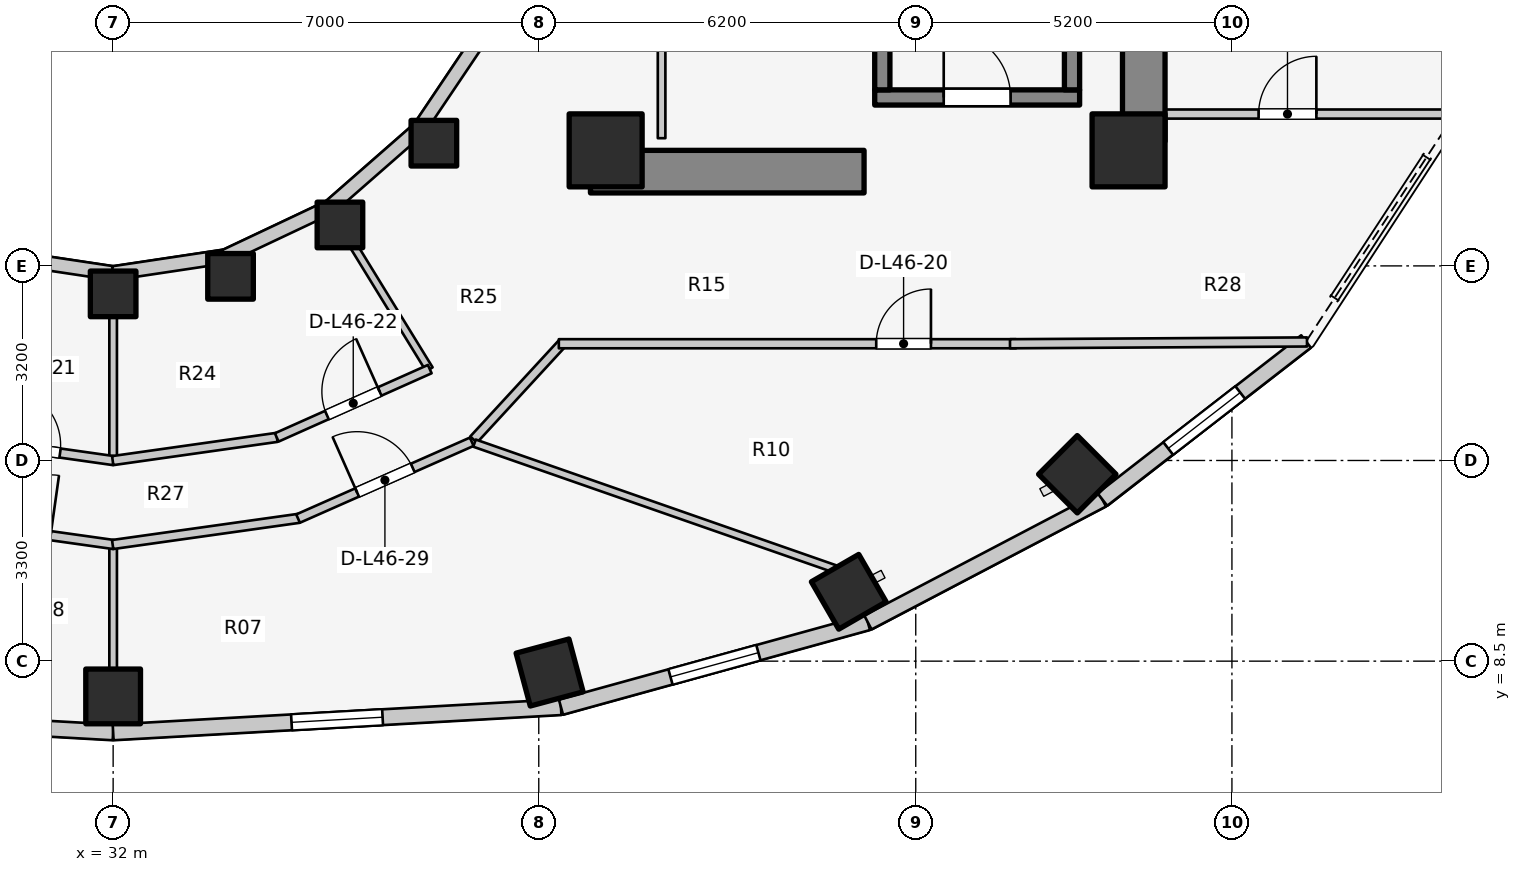
"""IFC4 building model, lengths in metres.
Left out: names, types, materials, properties, quantities, classifications, styles, units other than length and angle.
Written with IfcOpenShell. Run it as: python <this file> out.ifc"""

import sys

from ifc_helpers import new_model, si_unit, direction, frame, frame_2d, origin, origin_2d, place, context, subcontext, project, spatial, rectangle, extrude, element, fill, save


model = new_model("IFC4")
c1 = context("Model", 3, precision=1e-05, world=origin(), true_north=direction((0.0, 1.0)))
c2 = subcontext(c1, "Body", "Model", "MODEL_VIEW")
j1 = project(units=[si_unit("LENGTHUNIT", "METRE"), si_unit("PLANEANGLEUNIT", "RADIAN")], contexts=[c1])
p1 = place(None, origin())
s1 = spatial("IfcSite", under=j1, at=p1, CompositionType="ELEMENT")
p2 = place(p1, origin())
s2 = spatial("IfcBuilding", under=s1, at=p2, CompositionType="ELEMENT")
p3 = place(p2, frame((0.0, 0.0, 152.9)))
s3 = spatial("IfcBuildingStorey", under=s2, at=p3, CompositionType="ELEMENT", Elevation=152.9)
p4 = place(p3, frame((48.95, 17.05, 0.0), z_axis=(0.0, 0.0, 1.0), x_axis=(0.0, 1.0, 0.0)))
e1 = element("IfcWall", 1, at=p4, inside=s3, PredefinedType="SHEAR", context=c2, shape_type="SweptSolid", body=[
    extrude(rectangle(XDim=12.8, YDim=0.7, at=frame_2d((6.4, 0.0))), origin(), (0.0, 0.0, 1.0), 3.1),
])
p5 = place(p3, frame((39.85, 16.55, 0.0), z_axis=(0.0, 0.0, 1.0), x_axis=(1.0, 0.0, 0.0)))
e2 = element("IfcWall", 2, at=p5, inside=s3, PredefinedType="SHEAR", context=c2, shape_type="SweptSolid", body=[
    extrude(rectangle(XDim=4.5, YDim=0.7, at=frame_2d((2.25, 0.0))), origin(), (0.0, 0.0, 1.0), 3.1),
])
p6 = place(p3, frame((44.525, 17.77, 0.0), z_axis=(0.0, 0.0, 1.0), x_axis=(1.0, 0.0, 0.0)))
e3 = element("IfcWall", 3, at=p6, inside=s3, PredefinedType="SOLIDWALL", context=c2, shape_type="SweptSolid", body=[
    extrude(rectangle(XDim=3.37, YDim=0.25, at=frame_2d((1.685, 0.0))), origin(), (0.0, 0.0, 1.0), 3.1),
])
p7 = place(p6, frame((1.135, 0.0, 0.0)))
e4 = element("IfcOpeningElement", 4, at=p7, cuts=e3, PredefinedType="OPENING", context=c2, shape_type="SweptSolid", body=[
    extrude(rectangle(XDim=1.1, YDim=2.1, at=frame_2d((0.55, 1.05))), frame((0.0, 0.135, 0.0), z_axis=(0.0, -1.0, 0.0), x_axis=(1.0, 0.0, 0.0)), (0.0, 0.0, 1.0), 0.27),
])
for number, where, z_axis, x_axis in (
    (5, (44.65, 17.895, 0.0), (0.0, 0.0, 1.0), (0.0, 1.0, 0.0)),
    (6, (47.77, 17.895, 0.0), (0.0, 0.0, 1.0), (0.0, 1.0, 0.0)),
):
    element("IfcWall", number, at=place(p3, frame(where, z_axis=z_axis, x_axis=x_axis)), inside=s3, PredefinedType="SOLIDWALL", context=c2, shape_type="SweptSolid", body=[
        extrude(rectangle(XDim=7.81, YDim=0.25, at=frame_2d((3.905, 0.0))), origin(), (0.0, 0.0, 1.0), 3.1),
    ])
for number, where, z_axis, x_axis in (
    (7, (40.1, 16.9, 0.0), (0.0, 0.0, 1.0), (1.0, 0.0, 0.0)),
    (8, (48.7, 16.9, 0.0), (0.0, 0.0, 1.0), (1.0, 0.0, 0.0)),
):
    element("IfcColumn", number, at=place(p3, frame(where, z_axis=z_axis, x_axis=x_axis)), inside=s3, PredefinedType="COLUMN", context=c2, shape_type="SweptSolid", body=[
        extrude(rectangle(XDim=1.2, YDim=1.2, at=origin_2d()), origin(), (0.0, 0.0, 1.0), 3.1),
    ])
p8 = place(p3, frame((32.0, 14.54, 0.0), z_axis=(0.0, 0.0, 1.0), x_axis=(1.0, 0.0, 0.0)))
e9 = element("IfcColumn", 9, at=p8, inside=s3, PredefinedType="COLUMN", context=c2, shape_type="SweptSolid", body=[
    extrude(rectangle(XDim=0.75, YDim=0.75, at=origin_2d()), origin(), (0.0, 0.0, 1.0), 3.1),
])
p9 = place(p3, frame((32.0, 7.92, 0.0), z_axis=(0.0, 0.0, 1.0), x_axis=(0.0, -1.0, 0.0)))
e10 = element("IfcColumn", 10, at=p9, inside=s3, PredefinedType="COLUMN", context=c2, shape_type="SweptSolid", body=[
    extrude(rectangle(XDim=0.9, YDim=0.9, at=origin_2d()), origin(), (0.0, 0.0, 1.0), 3.1),
])
p10 = place(p3, frame((33.931, 14.828, 0.0), z_axis=(0.0, 0.0, 1.0), x_axis=(1.0, 0.0, 0.0)))
e11 = element("IfcColumn", 11, at=p10, inside=s3, PredefinedType="COLUMN", context=c2, shape_type="SweptSolid", body=[
    extrude(rectangle(XDim=0.75, YDim=0.75, at=origin_2d()), origin(), (0.0, 0.0, 1.0), 3.1),
])
p11 = place(p3, frame((39.178, 8.313, 0.0), z_axis=(0.0, 0.0, 1.0), x_axis=(0.258819045103, -0.965925826289, 0.0)))
e12 = element("IfcColumn", 12, at=p11, inside=s3, PredefinedType="COLUMN", context=c2, shape_type="SweptSolid", body=[
    extrude(rectangle(XDim=0.9, YDim=0.9, at=origin_2d()), origin(), (0.0, 0.0, 1.0), 3.1),
])
p12 = place(p3, frame((35.73, 15.673, 0.0), z_axis=(0.0, 0.0, 1.0), x_axis=(1.0, 0.0, 0.0)))
e13 = element("IfcColumn", 13, at=p12, inside=s3, PredefinedType="COLUMN", context=c2, shape_type="SweptSolid", body=[
    extrude(rectangle(XDim=0.75, YDim=0.75, at=origin_2d()), origin(), (0.0, 0.0, 1.0), 3.1),
])
p13 = place(p3, frame((44.098, 9.641, 0.0), z_axis=(0.0, 0.0, 1.0), x_axis=(0.5, -0.866025403784, 0.0)))
e14 = element("IfcColumn", 14, at=p13, inside=s3, PredefinedType="COLUMN", context=c2, shape_type="SweptSolid", body=[
    extrude(rectangle(XDim=0.9, YDim=0.9, at=origin_2d()), origin(), (0.0, 0.0, 1.0), 3.1),
])
p14 = place(p3, frame((37.275, 17.018, 0.0), z_axis=(0.0, 0.0, 1.0), x_axis=(1.0, 0.0, 0.0)))
e15 = element("IfcColumn", 15, at=p14, inside=s3, PredefinedType="COLUMN", context=c2, shape_type="SweptSolid", body=[
    extrude(rectangle(XDim=0.75, YDim=0.75, at=origin_2d()), origin(), (0.0, 0.0, 1.0), 3.1),
])
p15 = place(p3, frame((47.857, 11.573, 0.0), z_axis=(0.0, 0.0, 1.0), x_axis=(0.707106781187, -0.707106781187, 0.0)))
e16 = element("IfcColumn", 16, at=p15, inside=s3, PredefinedType="COLUMN", context=c2, shape_type="SweptSolid", body=[
    extrude(rectangle(XDim=0.9, YDim=0.9, at=origin_2d()), origin(), (0.0, 0.0, 1.0), 3.1),
])
for number, where, z_axis, x_axis in (
    (17, (30.157, 15.157, 0.0), (0.0, 0.0, 1.0), (0.989, -0.149, 0.0)),
    (18, (32.0, 14.88, 0.0), (0.0, 0.0, 1.0), (0.989, 0.149, 0.0)),
):
    element("IfcWall", number, at=place(p3, frame(where, z_axis=z_axis, x_axis=x_axis)), inside=s3, PredefinedType="STANDARD", context=c2, shape_type="SweptSolid", body=[
        extrude(rectangle(XDim=1.864, YDim=0.23, at=frame_2d((0.932, 0.0))), origin(), (0.0, 0.0, 1.0), 2.16),
    ])
p16 = place(p3, frame((33.843, 15.157, 0.0), z_axis=(0.0, 0.0, 1.0), x_axis=(0.904179699603, 0.427152280606, 0.0)))
e19 = element("IfcWall", 19, at=p16, inside=s3, PredefinedType="STANDARD", context=c2, shape_type="SweptSolid", body=[
    extrude(rectangle(XDim=1.899, YDim=0.23, at=frame_2d((0.95, 0.0))), origin(), (0.0, 0.0, 1.0), 2.16),
])
p17 = place(p3, frame((35.56, 15.968, 0.0), z_axis=(0.0, 0.0, 1.0), x_axis=(0.752576694707, 0.658504607869, 0.0)))
e20 = element("IfcWall", 20, at=p17, inside=s3, PredefinedType="STANDARD", context=c2, shape_type="SweptSolid", body=[
    extrude(rectangle(XDim=1.959, YDim=0.23, at=frame_2d((0.98, 0.0))), origin(), (0.0, 0.0, 1.0), 2.16),
])
p18 = place(p3, frame((37.035, 17.258, 0.0), z_axis=(0.0, 0.0, 1.0), x_axis=(0.558197800898, 0.829707909492, 0.0)))
e21 = element("IfcWall", 21, at=p18, inside=s3, PredefinedType="STANDARD", context=c2, shape_type="SweptSolid", body=[
    extrude(rectangle(XDim=2.027, YDim=0.23, at=frame_2d((1.013, 0.0))), origin(), (0.0, 0.0, 1.0), 2.16),
])
p19 = place(p3, frame((24.635, 7.743, 0.0), z_axis=(0.0, 0.0, 1.0), x_axis=(0.998417906562, -0.056228852534, 0.0)))
e22 = element("IfcWall", 22, at=p19, inside=s3, PredefinedType="STANDARD", context=c2, shape_type="SweptSolid", body=[
    extrude(rectangle(XDim=7.377, YDim=0.26, at=frame_2d((3.688, 0.0))), origin(), (0.0, 0.0, 1.0), 2.85),
])
p20 = place(p19, frame((2.488, 0.0, 0.75)))
e23 = element("IfcOpeningElement", 23, at=p20, cuts=e22, PredefinedType="OPENING", context=c2, shape_type="SweptSolid", body=[
    extrude(rectangle(XDim=2.4, YDim=1.7, at=frame_2d((1.2, 0.85))), frame((0.0, 0.14, 0.0), z_axis=(0.0, -1.0, 0.0), x_axis=(1.0, 0.0, 0.0)), (0.0, 0.0, 1.0), 0.28),
])
p21 = place(p3, frame((32.0, 7.329, 0.0), z_axis=(0.0, 0.0, 1.0), x_axis=(0.998417906562, 0.056228852534, 0.0)))
e24 = element("IfcWall", 24, at=p21, inside=s3, PredefinedType="STANDARD", context=c2, shape_type="SweptSolid", body=[
    extrude(rectangle(XDim=7.377, YDim=0.26, at=frame_2d((3.688, 0.0))), origin(), (0.0, 0.0, 1.0), 2.85),
])
p22 = place(p21, frame((2.938, 0.0, 0.75)))
e25 = element("IfcOpeningElement", 25, at=p22, cuts=e24, PredefinedType="OPENING", context=c2, shape_type="SweptSolid", body=[
    extrude(rectangle(XDim=1.5, YDim=1.6, at=frame_2d((0.75, 0.8))), frame((0.0, 0.14, 0.0), z_axis=(0.0, -1.0, 0.0), x_axis=(1.0, 0.0, 0.0)), (0.0, 0.0, 1.0), 0.28),
])
p23 = place(p3, frame((39.365, 7.743, 0.0), z_axis=(0.0, 0.0, 1.0), x_axis=(0.963953455704, 0.26607092144, 0.0)))
e26 = element("IfcWall", 26, at=p23, inside=s3, PredefinedType="STANDARD", context=c2, shape_type="SweptSolid", body=[
    extrude(rectangle(XDim=5.237, YDim=0.26, at=frame_2d((2.618, 0.0))), origin(), (0.0, 0.0, 1.0), 2.85),
])
p24 = place(p23, frame((1.868, 0.0, 0.75)))
e27 = element("IfcOpeningElement", 27, at=p24, cuts=e26, PredefinedType="OPENING", context=c2, shape_type="SweptSolid", body=[
    extrude(rectangle(XDim=1.5, YDim=1.6, at=frame_2d((0.75, 0.8))), frame((0.0, 0.14, 0.0), z_axis=(0.0, -1.0, 0.0), x_axis=(1.0, 0.0, 0.0)), (0.0, 0.0, 1.0), 0.28),
])
p25 = place(p3, frame((44.413, 9.137, 0.0), z_axis=(0.0, 0.0, 1.0), x_axis=(0.885660265226, 0.464333818065, 0.0)))
e28 = element("IfcWall", 28, at=p25, inside=s3, PredefinedType="STANDARD", context=c2, shape_type="SweptSolid", body=[
    extrude(rectangle(XDim=4.354, YDim=0.26, at=frame_2d((2.177, 0.0))), origin(), (0.0, 0.0, 1.0), 2.85),
])
p26 = place(p3, frame((48.269, 11.158, 0.0), z_axis=(0.0, 0.0, 1.0), x_axis=(0.790185650662, 0.612867552973, 0.0)))
e29 = element("IfcWall", 29, at=p26, inside=s3, PredefinedType="STANDARD", context=c2, shape_type="SweptSolid", body=[
    extrude(rectangle(XDim=4.239, YDim=0.26, at=frame_2d((2.12, 0.0))), origin(), (0.0, 0.0, 1.0), 2.85),
])
p27 = place(p26, frame((1.37, 0.0, 0.75)))
e30 = element("IfcOpeningElement", 30, at=p27, cuts=e29, PredefinedType="OPENING", context=c2, shape_type="SweptSolid", body=[
    extrude(rectangle(XDim=1.5, YDim=1.6, at=frame_2d((0.75, 0.8))), frame((0.0, 0.14, 0.0), z_axis=(0.0, -1.0, 0.0), x_axis=(1.0, 0.0, 0.0)), (0.0, 0.0, 1.0), 0.28),
])
p28 = place(p3, frame((41.02, 17.1, 0.0), z_axis=(0.0, 0.0, 1.0), x_axis=(0.0, 1.0, 0.0)))
e31 = element("IfcWall", 31, at=p28, inside=s3, PredefinedType="PARTITIONING", context=c2, shape_type="SweptSolid", body=[
    extrude(rectangle(XDim=2.04, YDim=0.125, at=frame_2d((1.02, 0.0))), origin(), (0.0, 0.0, 1.0), 2.855),
])
p29 = place(p3, frame((48.95, 17.497, 0.0), z_axis=(0.0, 0.0, 1.0), x_axis=(1.0, 0.0, 0.0)))
e32 = element("IfcWall", 32, at=p29, inside=s3, PredefinedType="PARTITIONING", context=c2, shape_type="SweptSolid", body=[
    extrude(rectangle(XDim=5.14, YDim=0.15, at=frame_2d((2.57, 0.0))), origin(), (0.0, 0.0, 1.0), 2.855),
])
p30 = place(p29, frame((1.889, 0.0, 0.0)))
e33 = element("IfcOpeningElement", 33, at=p30, cuts=e32, PredefinedType="OPENING", context=c2, shape_type="SweptSolid", body=[
    extrude(rectangle(XDim=0.95, YDim=2.1, at=frame_2d((0.475, 1.05))), frame((0.0, 0.085, 0.0), z_axis=(0.0, -1.0, 0.0), x_axis=(1.0, 0.0, 0.0)), (0.0, 0.0, 1.0), 0.17),
])
p31 = place(p3, frame((37.928, 12.144, 0.0), z_axis=(0.0, 0.0, 1.0), x_axis=(0.677579737957, 0.735449317567, 0.0)))
e34 = element("IfcWall", 34, at=p31, inside=s3, PredefinedType="PARTITIONING", context=c2, shape_type="SweptSolid", body=[
    extrude(rectangle(XDim=2.173, YDim=0.15, at=frame_2d((1.086, 0.0))), origin(), (0.0, 0.0, 1.0), 2.299),
])
p32 = place(p3, frame((39.33, 13.72, 0.0), z_axis=(0.0, 0.0, 1.0), x_axis=(1.0, 0.0, 0.0)))
e35 = element("IfcWall", 35, at=p32, inside=s3, PredefinedType="PARTITIONING", context=c2, shape_type="SweptSolid", body=[
    extrude(rectangle(XDim=7.52, YDim=0.15, at=frame_2d((3.76, 0.0))), origin(), (0.0, 0.0, 1.0), 2.299),
])
p33 = place(p32, frame((5.22, 0.0, 0.0)))
e36 = element("IfcOpeningElement", 36, at=p33, cuts=e35, PredefinedType="OPENING", context=c2, shape_type="SweptSolid", body=[
    extrude(rectangle(XDim=0.9, YDim=2.1, at=frame_2d((0.45, 1.05))), frame((0.0, 0.085, 0.0), z_axis=(0.0, -1.0, 0.0), x_axis=(1.0, 0.0, 0.0)), (0.0, 0.0, 1.0), 0.17),
])
p34 = place(p3, frame((46.75, 13.72, 0.0), z_axis=(0.0, 0.0, 1.0), x_axis=(0.999981712056, 0.006047772638, 0.0)))
e37 = element("IfcWall", 37, at=p34, inside=s3, PredefinedType="PARTITIONING", context=c2, shape_type="SweptSolid", body=[
    extrude(rectangle(XDim=4.885, YDim=0.15, at=frame_2d((2.442, 0.0))), origin(), (0.0, 0.0, 1.0), 2.22),
])
p35 = place(p3, frame((32.0, 14.9, 0.0), z_axis=(0.0, 0.0, 1.0), x_axis=(0.0, -1.0, 0.0)))
e38 = element("IfcWall", 38, at=p35, inside=s3, PredefinedType="PARTITIONING", context=c2, shape_type="SweptSolid", body=[
    extrude(rectangle(XDim=3.102, YDim=0.125, at=frame_2d((1.551, 0.0))), origin(), (0.0, 0.0, 1.0), 2.299),
])
p36 = place(p3, frame((35.55, 15.985, 0.0), z_axis=(0.0, 0.0, 1.0), x_axis=(0.523587550846, -0.851971875474, 0.0)))
e39 = element("IfcWall", 39, at=p36, inside=s3, PredefinedType="PARTITIONING", context=c2, shape_type="SweptSolid", body=[
    extrude(rectangle(XDim=3.153, YDim=0.125, at=frame_2d((1.577, 0.0))), origin(), (0.0, 0.0, 1.0), 2.299),
])
p37 = place(p3, frame((29.306, 12.18, 0.0), z_axis=(0.0, 0.0, 1.0), x_axis=(0.990145400278, -0.140043158738, 0.0)))
e40 = element("IfcWall", 40, at=p37, inside=s3, PredefinedType="PARTITIONING", context=c2, shape_type="SweptSolid", body=[
    extrude(rectangle(XDim=2.728, YDim=0.15, at=frame_2d((1.364, 0.0))), origin(), (0.0, 0.0, 1.0), 2.299),
])
p38 = place(p37, frame((0.889, 0.0, 0.0)))
e41 = element("IfcOpeningElement", 41, at=p38, cuts=e40, PredefinedType="OPENING", context=c2, shape_type="SweptSolid", body=[
    extrude(rectangle(XDim=0.95, YDim=2.1, at=frame_2d((0.475, 1.05))), frame((0.0, 0.085, 0.0), z_axis=(0.0, -1.0, 0.0), x_axis=(1.0, 0.0, 0.0)), (0.0, 0.0, 1.0), 0.17),
])
p39 = place(p3, frame((31.993, 11.798, 0.0), z_axis=(0.0, 0.0, 1.0), x_axis=(0.990145400278, 0.140043158738, 0.0)))
e42 = element("IfcWall", 42, at=p39, inside=s3, PredefinedType="PARTITIONING", context=c2, shape_type="SweptSolid", body=[
    extrude(rectangle(XDim=2.728, YDim=0.15, at=frame_2d((1.364, 0.0))), origin(), (0.0, 0.0, 1.0), 2.299),
])
p40 = place(p3, frame((34.69, 12.179, 0.0), z_axis=(0.0, 0.0, 1.0), x_axis=(0.913145536541, 0.407633694749, 0.0)))
e43 = element("IfcWall", 43, at=p40, inside=s3, PredefinedType="PARTITIONING", context=c2, shape_type="SweptSolid", body=[
    extrude(rectangle(XDim=2.756, YDim=0.15, at=frame_2d((1.378, 0.0))), origin(), (0.0, 0.0, 1.0), 2.299),
])
p41 = place(p40, frame((0.903, 0.0, 0.0)))
e44 = element("IfcOpeningElement", 44, at=p41, cuts=e43, PredefinedType="OPENING", context=c2, shape_type="SweptSolid", body=[
    extrude(rectangle(XDim=0.95, YDim=2.1, at=frame_2d((0.475, 1.05))), frame((0.0, 0.085, 0.0), z_axis=(0.0, -1.0, 0.0), x_axis=(1.0, 0.0, 0.0)), (0.0, 0.0, 1.0), 0.17),
])
p42 = place(p3, frame((32.0, 10.363, 0.0), z_axis=(0.0, 0.0, 1.0), x_axis=(0.0, -1.0, 0.0)))
e45 = element("IfcWall", 45, at=p42, inside=s3, PredefinedType="PARTITIONING", context=c2, shape_type="SweptSolid", body=[
    extrude(rectangle(XDim=2.013, YDim=0.125, at=frame_2d((1.006, 0.0))), origin(), (0.0, 0.0, 1.0), 2.299),
])
p43 = place(p3, frame((37.943, 12.086, 0.0), z_axis=(0.0, 0.0, 1.0), x_axis=(0.944182779284, -0.329422038278, 0.0)))
e46 = element("IfcWall", 46, at=p43, inside=s3, PredefinedType="PARTITIONING", context=c2, shape_type="SweptSolid", body=[
    extrude(rectangle(XDim=6.291, YDim=0.125, at=frame_2d((3.146, 0.0))), origin(), (0.0, 0.0, 1.0), 2.299),
])
p44 = place(p3, frame((28.943, 10.849, 0.0), z_axis=(0.0, 0.0, 1.0), x_axis=(0.990254709652, -0.13926812274, 0.0)))
e47 = element("IfcWall", 47, at=p44, inside=s3, PredefinedType="PARTITIONING", context=c2, shape_type="SweptSolid", body=[
    extrude(rectangle(XDim=3.096, YDim=0.15, at=frame_2d((1.548, 0.0))), origin(), (0.0, 0.0, 1.0), 2.299),
])
p45 = place(p44, frame((1.048, 0.0, 0.0)))
e48 = element("IfcOpeningElement", 48, at=p45, cuts=e47, PredefinedType="OPENING", context=c2, shape_type="SweptSolid", body=[
    extrude(rectangle(XDim=1.0, YDim=2.1, at=frame_2d((0.5, 1.05))), frame((0.0, 0.085, 0.0), z_axis=(0.0, -1.0, 0.0), x_axis=(1.0, 0.0, 0.0)), (0.0, 0.0, 1.0), 0.17),
])
p46 = place(p3, frame((31.992, 10.418, 0.0), z_axis=(0.0, 0.0, 1.0), x_axis=(0.990254709652, 0.13926812274, 0.0)))
e49 = element("IfcWall", 49, at=p46, inside=s3, PredefinedType="PARTITIONING", context=c2, shape_type="SweptSolid", body=[
    extrude(rectangle(XDim=3.096, YDim=0.15, at=frame_2d((1.548, 0.0))), origin(), (0.0, 0.0, 1.0), 2.299),
])
p47 = place(p3, frame((35.042, 10.844, 0.0), z_axis=(0.0, 0.0, 1.0), x_axis=(0.914519212393, 0.40454247016, 0.0)))
e50 = element("IfcWall", 50, at=p47, inside=s3, PredefinedType="PARTITIONING", context=c2, shape_type="SweptSolid", body=[
    extrude(rectangle(XDim=3.124, YDim=0.15, at=frame_2d((1.562, 0.0))), origin(), (0.0, 0.0, 1.0), 2.299),
])
p48 = place(p47, frame((1.062, 0.0, 0.0)))
e51 = element("IfcOpeningElement", 51, at=p48, cuts=e50, PredefinedType="OPENING", context=c2, shape_type="SweptSolid", body=[
    extrude(rectangle(XDim=1.0, YDim=2.1, at=frame_2d((0.5, 1.05))), frame((0.0, 0.085, 0.0), z_axis=(0.0, -1.0, 0.0), x_axis=(1.0, 0.0, 0.0)), (0.0, 0.0, 1.0), 0.17),
])
p49 = place(p22, origin())
e52 = element("IfcWindow", 52, at=p49, inside=s3, PartitioningType="SINGLE_PANEL", PredefinedType="WINDOW", context=c2, shape_type="SweptSolid", body=[
    extrude(rectangle(XDim=1.5, YDim=1.6, at=frame_2d((0.75, 0.8))), frame((0.0, 0.03, 0.0), z_axis=(0.0, -1.0, 0.0), x_axis=(1.0, 0.0, 0.0)), (0.0, 0.0, 1.0), 0.06),
])
fill(e25, e52)
p50 = place(p24, origin())
e53 = element("IfcWindow", 53, at=p50, inside=s3, PartitioningType="SINGLE_PANEL", PredefinedType="WINDOW", context=c2, shape_type="SweptSolid", body=[
    extrude(rectangle(XDim=1.5, YDim=1.6, at=frame_2d((0.75, 0.8))), frame((0.0, 0.03, 0.0), z_axis=(0.0, -1.0, 0.0), x_axis=(1.0, 0.0, 0.0)), (0.0, 0.0, 1.0), 0.06),
])
fill(e27, e53)
p51 = place(p27, origin())
e54 = element("IfcWindow", 54, at=p51, inside=s3, PartitioningType="SINGLE_PANEL", PredefinedType="WINDOW", context=c2, shape_type="SweptSolid", body=[
    extrude(rectangle(XDim=1.5, YDim=1.6, at=frame_2d((0.75, 0.8))), frame((0.0, 0.03, 0.0), z_axis=(0.0, -1.0, 0.0), x_axis=(1.0, 0.0, 0.0)), (0.0, 0.0, 1.0), 0.06),
])
fill(e30, e54)
p52 = place(p7, origin())
e55 = element("IfcDoor", 55, at=p52, inside=s3, OperationType="SINGLE_SWING_LEFT", PredefinedType="DOOR", context=c2, shape_type="SweptSolid", body=[
    extrude(rectangle(XDim=1.1, YDim=2.1, at=frame_2d((0.55, 1.05))), frame((0.0, 0.025, 0.0), z_axis=(0.0, -1.0, 0.0), x_axis=(1.0, 0.0, 0.0)), (0.0, 0.0, 1.0), 0.05),
])
fill(e4, e55)
p53 = place(p30, origin())
e56 = element("IfcDoor", 56, at=p53, inside=s3, OperationType="SINGLE_SWING_RIGHT", PredefinedType="DOOR", context=c2, shape_type="SweptSolid", body=[
    extrude(rectangle(XDim=0.95, YDim=2.1, at=frame_2d((0.475, 1.05))), frame((0.0, 0.025, 0.0), z_axis=(0.0, -1.0, 0.0), x_axis=(1.0, 0.0, 0.0)), (0.0, 0.0, 1.0), 0.05),
])
fill(e33, e56)
p54 = place(p33, origin())
e57 = element("IfcDoor", 57, at=p54, inside=s3, OperationType="SINGLE_SWING_RIGHT", PredefinedType="DOOR", context=c2, shape_type="SweptSolid", body=[
    extrude(rectangle(XDim=0.9, YDim=2.1, at=frame_2d((0.45, 1.05))), frame((0.0, 0.025, 0.0), z_axis=(0.0, -1.0, 0.0), x_axis=(1.0, 0.0, 0.0)), (0.0, 0.0, 1.0), 0.05),
])
fill(e36, e57)
p55 = place(p38, origin())
e58 = element("IfcDoor", 58, at=p55, inside=s3, OperationType="SINGLE_SWING_LEFT", PredefinedType="DOOR", context=c2, shape_type="SweptSolid", body=[
    extrude(rectangle(XDim=0.95, YDim=2.1, at=frame_2d((0.475, 1.05))), frame((0.0, 0.025, 0.0), z_axis=(0.0, -1.0, 0.0), x_axis=(1.0, 0.0, 0.0)), (0.0, 0.0, 1.0), 0.05),
])
fill(e41, e58)
p56 = place(p41, origin())
e59 = element("IfcDoor", 59, at=p56, inside=s3, OperationType="SINGLE_SWING_RIGHT", PredefinedType="DOOR", context=c2, shape_type="SweptSolid", body=[
    extrude(rectangle(XDim=0.95, YDim=2.1, at=frame_2d((0.475, 1.05))), frame((0.0, 0.025, 0.0), z_axis=(0.0, -1.0, 0.0), x_axis=(1.0, 0.0, 0.0)), (0.0, 0.0, 1.0), 0.05),
])
fill(e44, e59)
p57 = place(p48, origin())
e60 = element("IfcDoor", 60, at=p57, inside=s3, OperationType="SINGLE_SWING_LEFT", PredefinedType="DOOR", context=c2, shape_type="SweptSolid", body=[
    extrude(rectangle(XDim=1.0, YDim=2.1, at=frame_2d((0.5, 1.05))), frame((0.0, 0.025, 0.0), z_axis=(0.0, -1.0, 0.0), x_axis=(1.0, 0.0, 0.0)), (0.0, 0.0, 1.0), 0.05),
])
fill(e51, e60)
save(model, sys.argv[1])
